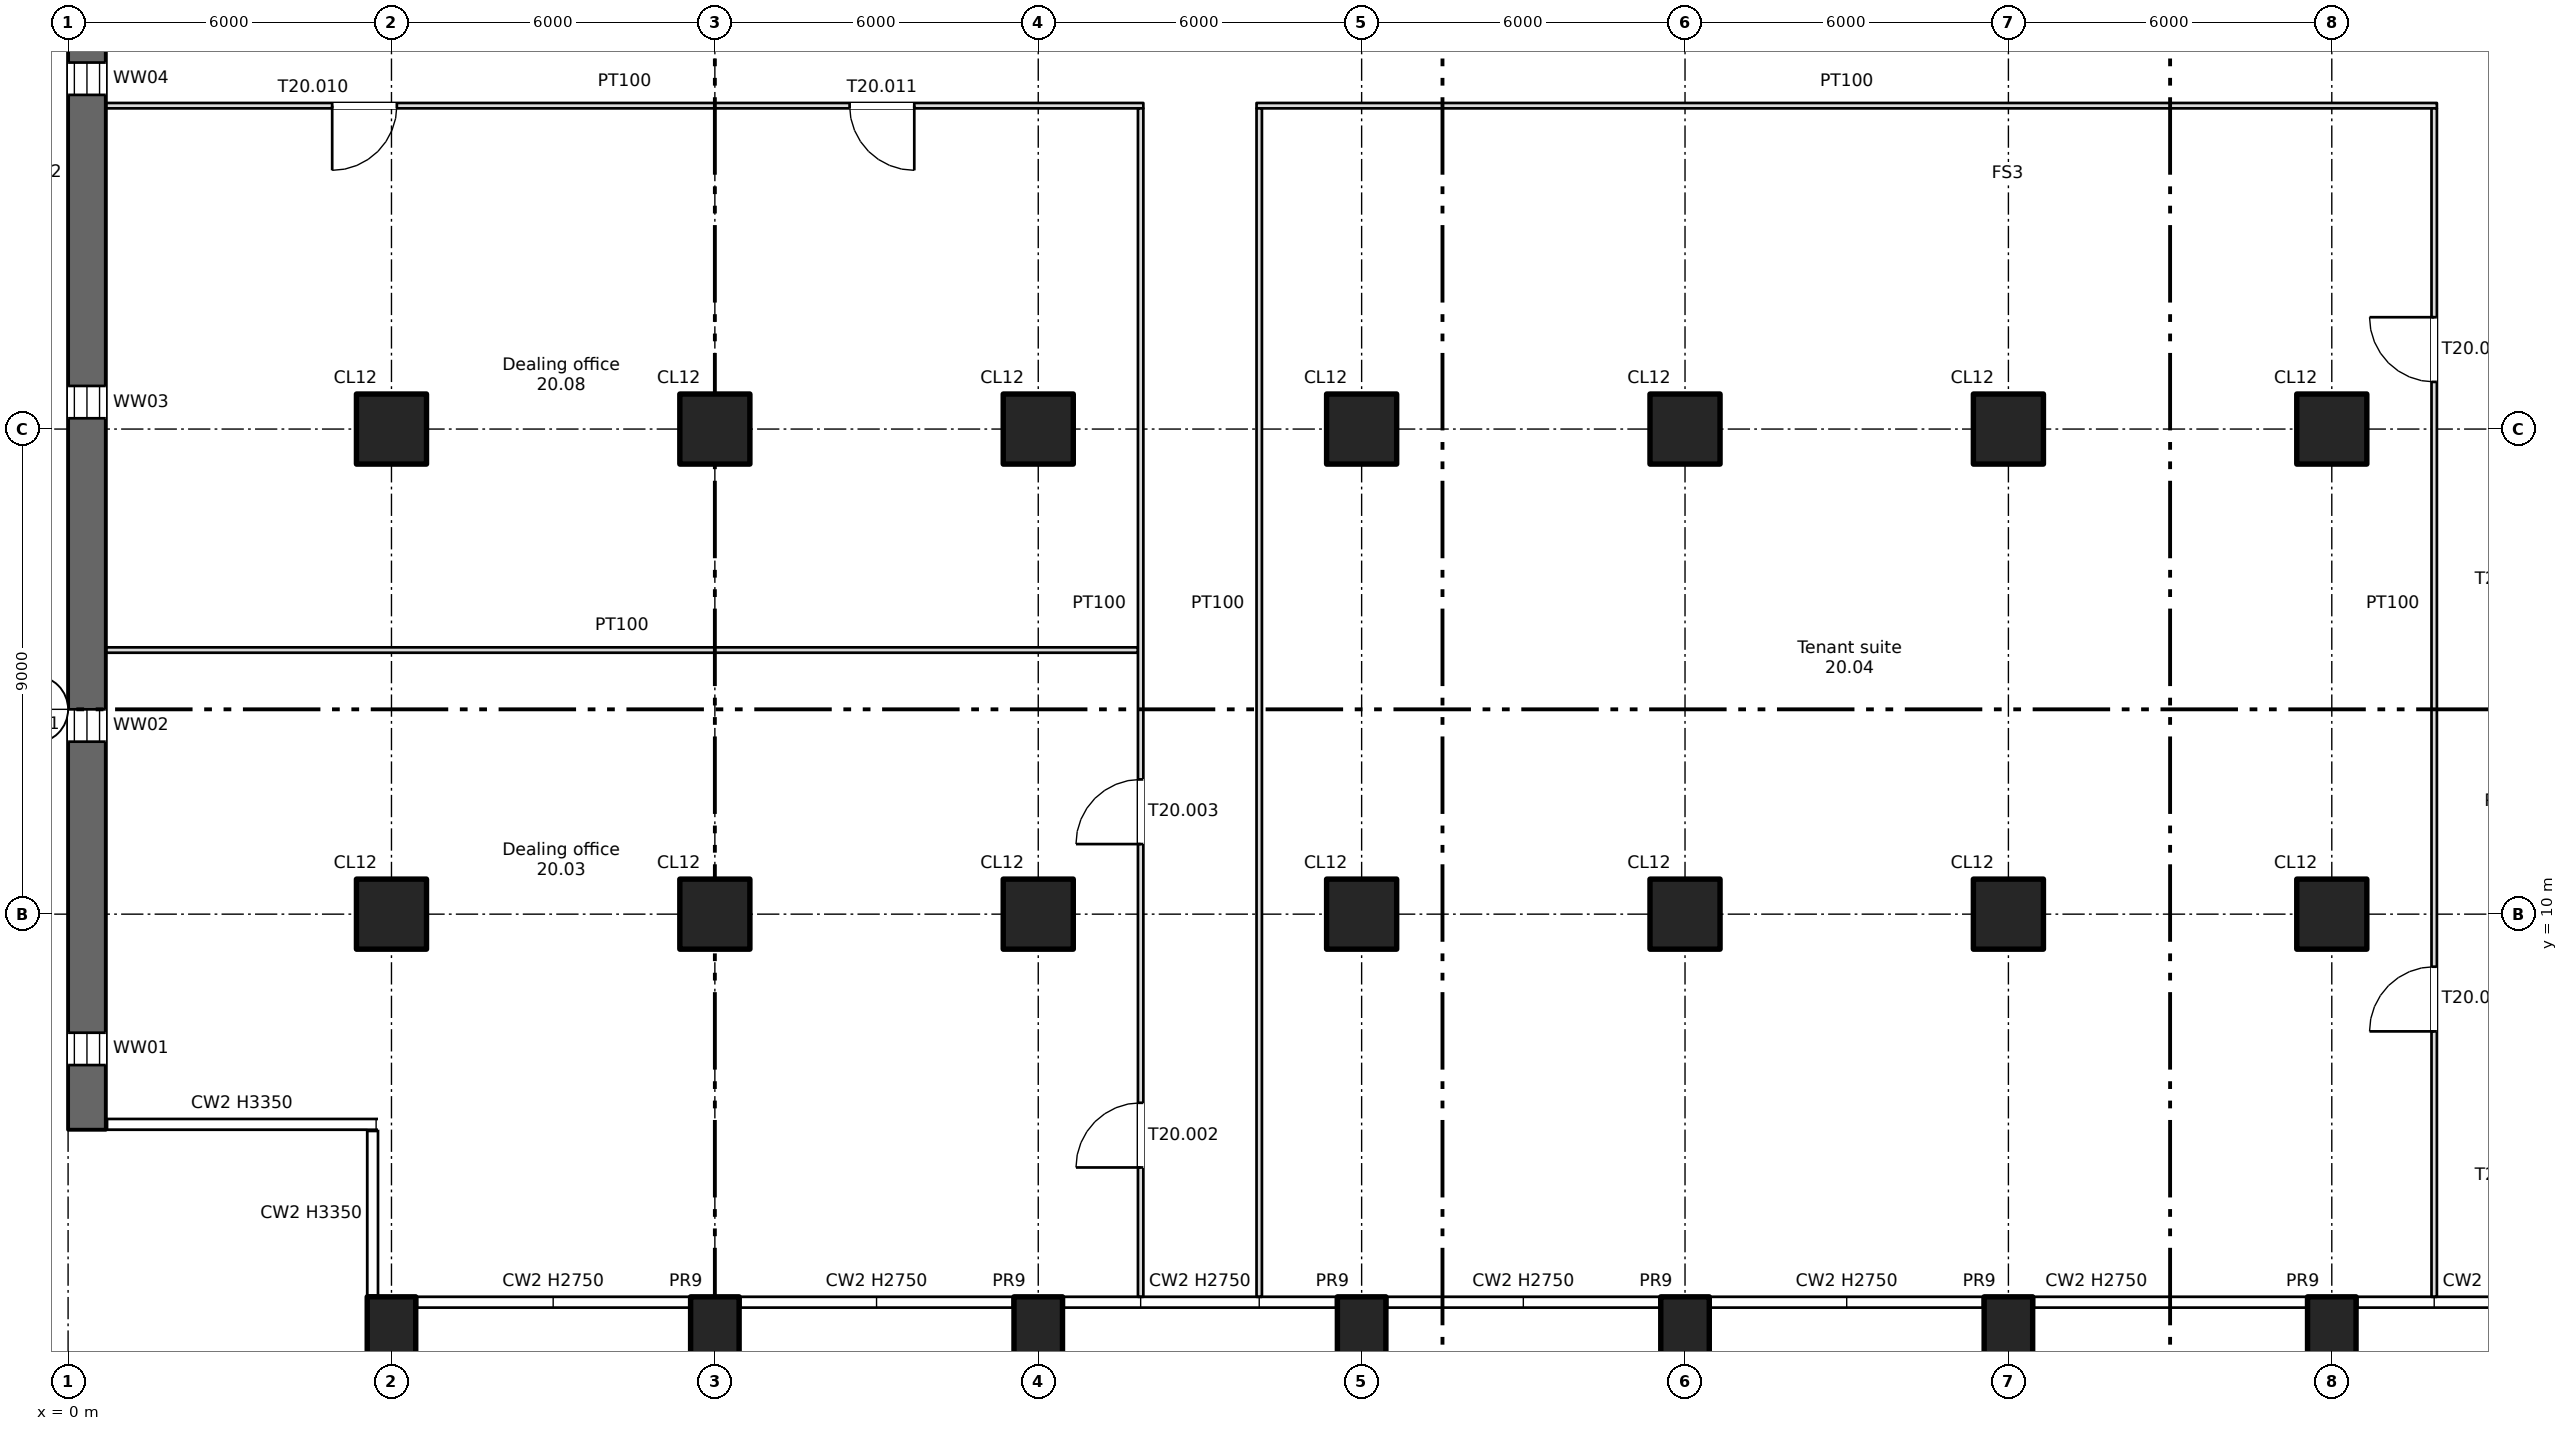
"""IFC4 building model, lengths in metres.
Left out: names, types, materials, properties, quantities, classifications, styles, units other than length and angle.
Written with IfcOpenShell. Run it as: python <this file> out.ifc"""

import sys

from ifc_helpers import new_model, si_unit, direction, frame, frame_2d, origin, origin_2d, place, context, subcontext, project, spatial, rectangle, extrude, element, fill, save


model = new_model("IFC4")
c1 = context("Model", 3, precision=1e-05, world=origin(), true_north=direction((0.0, 1.0)))
c2 = subcontext(c1, "Body", "Model", "MODEL_VIEW")
j1 = project(units=[si_unit("LENGTHUNIT", "METRE"), si_unit("PLANEANGLEUNIT", "RADIAN")], contexts=[c1])
p1 = place(None, origin())
s1 = spatial("IfcSite", under=j1, at=p1, CompositionType="ELEMENT")
p2 = place(p1, origin())
s2 = spatial("IfcBuilding", under=s1, at=p2, CompositionType="ELEMENT")
p3 = place(p2, frame((0.0, 0.0, 132.5)))
s3 = spatial("IfcBuildingStorey", under=s2, at=p3, CompositionType="ELEMENT", Elevation=132.5)
for number, where, z_axis, x_axis in (
    (1, (6.0, 2.2, -0.4), (0.0, 0.0, 1.0), (1.0, 0.0, 0.0)),
    (2, (12.0, 2.2, -0.4), (0.0, 0.0, 1.0), (1.0, 0.0, 0.0)),
    (3, (18.0, 2.2, -0.4), (0.0, 0.0, 1.0), (1.0, 0.0, 0.0)),
    (4, (24.0, 2.2, -0.4), (0.0, 0.0, 1.0), (1.0, 0.0, 0.0)),
    (5, (30.0, 2.2, -0.4), (0.0, 0.0, 1.0), (1.0, 0.0, 0.0)),
    (6, (36.0, 2.2, -0.4), (0.0, 0.0, 1.0), (1.0, 0.0, 0.0)),
    (7, (42.0, 2.2, -0.4), (0.0, 0.0, 1.0), (1.0, 0.0, 0.0)),
):
    element("IfcColumn", number, at=place(p3, frame(where, z_axis=z_axis, x_axis=x_axis)), inside=s3, PredefinedType="COLUMN", context=c2, shape_type="SweptSolid", body=[
        extrude(rectangle(XDim=0.9, YDim=1.4, at=origin_2d()), origin(), (0.0, 0.0, 1.0), 3.75),
    ])
for number, where, z_axis, x_axis in (
    (8, (6.0, 10.0, 0.0), (0.0, 0.0, 1.0), (1.0, 0.0, 0.0)),
    (9, (6.0, 19.0, 0.0), (0.0, 0.0, 1.0), (1.0, 0.0, 0.0)),
    (10, (12.0, 10.0, 0.0), (0.0, 0.0, 1.0), (1.0, 0.0, 0.0)),
    (11, (12.0, 19.0, 0.0), (0.0, 0.0, 1.0), (1.0, 0.0, 0.0)),
    (12, (18.0, 10.0, 0.0), (0.0, 0.0, 1.0), (1.0, 0.0, 0.0)),
    (13, (18.0, 19.0, 0.0), (0.0, 0.0, 1.0), (1.0, 0.0, 0.0)),
    (14, (24.0, 10.0, 0.0), (0.0, 0.0, 1.0), (1.0, 0.0, 0.0)),
    (15, (24.0, 19.0, 0.0), (0.0, 0.0, 1.0), (1.0, 0.0, 0.0)),
    (16, (30.0, 10.0, 0.0), (0.0, 0.0, 1.0), (1.0, 0.0, 0.0)),
    (17, (30.0, 19.0, 0.0), (0.0, 0.0, 1.0), (1.0, 0.0, 0.0)),
    (18, (36.0, 10.0, 0.0), (0.0, 0.0, 1.0), (1.0, 0.0, 0.0)),
    (19, (36.0, 19.0, 0.0), (0.0, 0.0, 1.0), (1.0, 0.0, 0.0)),
    (20, (42.0, 10.0, 0.0), (0.0, 0.0, 1.0), (1.0, 0.0, 0.0)),
    (21, (42.0, 19.0, 0.0), (0.0, 0.0, 1.0), (1.0, 0.0, 0.0)),
):
    element("IfcColumn", number, at=place(p3, frame(where, z_axis=z_axis, x_axis=x_axis)), inside=s3, PredefinedType="COLUMN", context=c2, shape_type="SweptSolid", body=[
        extrude(rectangle(XDim=1.3, YDim=1.3, at=origin_2d()), origin(), (0.0, 0.0, 1.0), 3.35),
    ])
p4 = place(p3, frame((0.35, 6.0, 0.0), z_axis=(0.0, 0.0, 1.0), x_axis=(0.0, 1.0, 0.0)))
e22 = element("IfcWall", 22, at=p4, inside=s3, PredefinedType="SHEAR", context=c2, shape_type="SweptSolid", body=[
    extrude(rectangle(XDim=35.5, YDim=0.7, at=frame_2d((17.75, 0.0))), origin(), (0.0, 0.0, 1.0), 3.35),
])
p5 = place(p4, frame((1.2, 0.0, 0.6)))
e23 = element("IfcOpeningElement", 23, at=p5, cuts=e22, PredefinedType="OPENING", context=c2, shape_type="SweptSolid", body=[
    extrude(rectangle(XDim=0.6, YDim=2.4, at=frame_2d((0.3, 1.2))), frame((0.0, 0.36, 0.0), z_axis=(0.0, -1.0, 0.0), x_axis=(1.0, 0.0, 0.0)), (0.0, 0.0, 1.0), 0.72),
])
p6 = place(p4, frame((7.2, 0.0, 0.6)))
e24 = element("IfcOpeningElement", 24, at=p6, cuts=e22, PredefinedType="OPENING", context=c2, shape_type="SweptSolid", body=[
    extrude(rectangle(XDim=0.6, YDim=2.4, at=frame_2d((0.3, 1.2))), frame((0.0, 0.36, 0.0), z_axis=(0.0, -1.0, 0.0), x_axis=(1.0, 0.0, 0.0)), (0.0, 0.0, 1.0), 0.72),
])
p7 = place(p4, frame((13.2, 0.0, 0.6)))
e25 = element("IfcOpeningElement", 25, at=p7, cuts=e22, PredefinedType="OPENING", context=c2, shape_type="SweptSolid", body=[
    extrude(rectangle(XDim=0.6, YDim=2.4, at=frame_2d((0.3, 1.2))), frame((0.0, 0.36, 0.0), z_axis=(0.0, -1.0, 0.0), x_axis=(1.0, 0.0, 0.0)), (0.0, 0.0, 1.0), 0.72),
])
p8 = place(p4, frame((19.2, 0.0, 0.6)))
e26 = element("IfcOpeningElement", 26, at=p8, cuts=e22, PredefinedType="OPENING", context=c2, shape_type="SweptSolid", body=[
    extrude(rectangle(XDim=0.6, YDim=2.4, at=frame_2d((0.3, 1.2))), frame((0.0, 0.36, 0.0), z_axis=(0.0, -1.0, 0.0), x_axis=(1.0, 0.0, 0.0)), (0.0, 0.0, 1.0), 0.72),
])
p9 = place(p4, frame((25.2, 0.0, 0.6)))
e27 = element("IfcOpeningElement", 27, at=p9, cuts=e22, PredefinedType="OPENING", context=c2, shape_type="SweptSolid", body=[
    extrude(rectangle(XDim=0.6, YDim=2.4, at=frame_2d((0.3, 1.2))), frame((0.0, 0.36, 0.0), z_axis=(0.0, -1.0, 0.0), x_axis=(1.0, 0.0, 0.0)), (0.0, 0.0, 1.0), 0.72),
])
p10 = place(p4, frame((31.2, 0.0, 0.6)))
e28 = element("IfcOpeningElement", 28, at=p10, cuts=e22, PredefinedType="OPENING", context=c2, shape_type="SweptSolid", body=[
    extrude(rectangle(XDim=0.6, YDim=2.4, at=frame_2d((0.3, 1.2))), frame((0.0, 0.36, 0.0), z_axis=(0.0, -1.0, 0.0), x_axis=(1.0, 0.0, 0.0)), (0.0, 0.0, 1.0), 0.72),
])
p11 = place(p3, frame((0.7, 14.9, 0.0), z_axis=(0.0, 0.0, 1.0), x_axis=(1.0, 0.0, 0.0)))
e29 = element("IfcWall", 29, at=p11, inside=s3, PredefinedType="PARTITIONING", context=c2, shape_type="SweptSolid", body=[
    extrude(rectangle(XDim=19.15, YDim=0.1, at=frame_2d((9.575, 0.0))), origin(), (0.0, 0.0, 1.0), 3.35),
])
p12 = place(p3, frame((0.7, 25.0, 0.0), z_axis=(0.0, 0.0, 1.0), x_axis=(1.0, 0.0, 0.0)))
e30 = element("IfcWall", 30, at=p12, inside=s3, PredefinedType="PARTITIONING", context=c2, shape_type="SweptSolid", body=[
    extrude(rectangle(XDim=19.25, YDim=0.1, at=frame_2d((9.625, 0.0))), origin(), (0.0, 0.0, 1.0), 3.35),
])
p13 = place(p12, frame((4.2, 0.0, 0.0)))
e31 = element("IfcOpeningElement", 31, at=p13, cuts=e30, PredefinedType="OPENING", context=c2, shape_type="SweptSolid", body=[
    extrude(rectangle(XDim=1.2, YDim=2.1, at=frame_2d((0.6, 1.05))), frame((0.0, 0.06, 0.0), z_axis=(0.0, -1.0, 0.0), x_axis=(1.0, 0.0, 0.0)), (0.0, 0.0, 1.0), 0.12),
])
p14 = place(p12, frame((13.8, 0.0, 0.0)))
e32 = element("IfcOpeningElement", 32, at=p14, cuts=e30, PredefinedType="OPENING", context=c2, shape_type="SweptSolid", body=[
    extrude(rectangle(XDim=1.2, YDim=2.1, at=frame_2d((0.6, 1.05))), frame((0.0, 0.06, 0.0), z_axis=(0.0, -1.0, 0.0), x_axis=(1.0, 0.0, 0.0)), (0.0, 0.0, 1.0), 0.12),
])
p15 = place(p3, frame((22.05, 25.0, 0.0), z_axis=(0.0, 0.0, 1.0), x_axis=(1.0, 0.0, 0.0)))
e33 = element("IfcWall", 33, at=p15, inside=s3, PredefinedType="PARTITIONING", context=c2, shape_type="SweptSolid", body=[
    extrude(rectangle(XDim=21.9, YDim=0.1, at=frame_2d((10.95, 0.0))), origin(), (0.0, 0.0, 1.0), 3.35),
])
p16 = place(p3, frame((19.9, 2.9, 0.0), z_axis=(0.0, 0.0, 1.0), x_axis=(0.0, 1.0, 0.0)))
e34 = element("IfcWall", 34, at=p16, inside=s3, PredefinedType="PARTITIONING", context=c2, shape_type="SweptSolid", body=[
    extrude(rectangle(XDim=22.05, YDim=0.1, at=frame_2d((11.025, 0.0))), origin(), (0.0, 0.0, 1.0), 3.35),
])
p17 = place(p16, frame((2.4, 0.0, 0.0)))
e35 = element("IfcOpeningElement", 35, at=p17, cuts=e34, PredefinedType="OPENING", context=c2, shape_type="SweptSolid", body=[
    extrude(rectangle(XDim=1.2, YDim=2.1, at=frame_2d((0.6, 1.05))), frame((0.0, 0.06, 0.0), z_axis=(0.0, -1.0, 0.0), x_axis=(1.0, 0.0, 0.0)), (0.0, 0.0, 1.0), 0.12),
])
p18 = place(p16, frame((8.4, 0.0, 0.0)))
e36 = element("IfcOpeningElement", 36, at=p18, cuts=e34, PredefinedType="OPENING", context=c2, shape_type="SweptSolid", body=[
    extrude(rectangle(XDim=1.2, YDim=2.1, at=frame_2d((0.6, 1.05))), frame((0.0, 0.06, 0.0), z_axis=(0.0, -1.0, 0.0), x_axis=(1.0, 0.0, 0.0)), (0.0, 0.0, 1.0), 0.12),
])
p19 = place(p3, frame((22.1, 2.9, 0.0), z_axis=(0.0, 0.0, 1.0), x_axis=(0.0, 1.0, 0.0)))
e37 = element("IfcWall", 37, at=p19, inside=s3, PredefinedType="PARTITIONING", context=c2, shape_type="SweptSolid", body=[
    extrude(rectangle(XDim=22.05, YDim=0.1, at=frame_2d((11.025, 0.0))), origin(), (0.0, 0.0, 1.0), 3.35),
])
p20 = place(p3, frame((43.9, 2.9, 0.0), z_axis=(0.0, 0.0, 1.0), x_axis=(0.0, 1.0, 0.0)))
e38 = element("IfcWall", 38, at=p20, inside=s3, PredefinedType="PARTITIONING", context=c2, shape_type="SweptSolid", body=[
    extrude(rectangle(XDim=22.05, YDim=0.1, at=frame_2d((11.025, 0.0))), origin(), (0.0, 0.0, 1.0), 3.35),
])
p21 = place(p20, frame((4.925, 0.0, 0.0)))
e39 = element("IfcOpeningElement", 39, at=p21, cuts=e38, PredefinedType="OPENING", context=c2, shape_type="SweptSolid", body=[
    extrude(rectangle(XDim=1.2, YDim=2.1, at=frame_2d((0.6, 1.05))), frame((0.0, 0.06, 0.0), z_axis=(0.0, -1.0, 0.0), x_axis=(1.0, 0.0, 0.0)), (0.0, 0.0, 1.0), 0.12),
])
p22 = place(p20, frame((16.975, 0.0, 0.0)))
e40 = element("IfcOpeningElement", 40, at=p22, cuts=e38, PredefinedType="OPENING", context=c2, shape_type="SweptSolid", body=[
    extrude(rectangle(XDim=1.2, YDim=2.1, at=frame_2d((0.6, 1.05))), frame((0.0, 0.06, 0.0), z_axis=(0.0, -1.0, 0.0), x_axis=(1.0, 0.0, 0.0)), (0.0, 0.0, 1.0), 0.12),
])
p23 = place(p5, origin())
e41 = element("IfcWindow", 41, at=p23, inside=s3, PartitioningType="SINGLE_PANEL", PredefinedType="WINDOW", context=c2, shape_type="SweptSolid", body=[
    extrude(rectangle(XDim=0.6, YDim=2.4, at=frame_2d((0.3, 1.2))), frame((0.0, 0.03, 0.0), z_axis=(0.0, -1.0, 0.0), x_axis=(1.0, 0.0, 0.0)), (0.0, 0.0, 1.0), 0.06),
])
fill(e23, e41)
p24 = place(p6, origin())
e42 = element("IfcWindow", 42, at=p24, inside=s3, PartitioningType="SINGLE_PANEL", PredefinedType="WINDOW", context=c2, shape_type="SweptSolid", body=[
    extrude(rectangle(XDim=0.6, YDim=2.4, at=frame_2d((0.3, 1.2))), frame((0.0, 0.03, 0.0), z_axis=(0.0, -1.0, 0.0), x_axis=(1.0, 0.0, 0.0)), (0.0, 0.0, 1.0), 0.06),
])
fill(e24, e42)
p25 = place(p7, origin())
e43 = element("IfcWindow", 43, at=p25, inside=s3, PartitioningType="SINGLE_PANEL", PredefinedType="WINDOW", context=c2, shape_type="SweptSolid", body=[
    extrude(rectangle(XDim=0.6, YDim=2.4, at=frame_2d((0.3, 1.2))), frame((0.0, 0.03, 0.0), z_axis=(0.0, -1.0, 0.0), x_axis=(1.0, 0.0, 0.0)), (0.0, 0.0, 1.0), 0.06),
])
fill(e25, e43)
p26 = place(p8, origin())
e44 = element("IfcWindow", 44, at=p26, inside=s3, PartitioningType="SINGLE_PANEL", PredefinedType="WINDOW", context=c2, shape_type="SweptSolid", body=[
    extrude(rectangle(XDim=0.6, YDim=2.4, at=frame_2d((0.3, 1.2))), frame((0.0, 0.03, 0.0), z_axis=(0.0, -1.0, 0.0), x_axis=(1.0, 0.0, 0.0)), (0.0, 0.0, 1.0), 0.06),
])
fill(e26, e44)
p27 = place(p17, origin())
e45 = element("IfcDoor", 45, at=p27, inside=s3, OperationType="SINGLE_SWING_LEFT", PredefinedType="DOOR", context=c2, shape_type="SweptSolid", body=[
    extrude(rectangle(XDim=1.2, YDim=2.1, at=frame_2d((0.6, 1.05))), frame((0.0, 0.025, 0.0), z_axis=(0.0, -1.0, 0.0), x_axis=(1.0, 0.0, 0.0)), (0.0, 0.0, 1.0), 0.05),
])
fill(e35, e45)
p28 = place(p18, origin())
e46 = element("IfcDoor", 46, at=p28, inside=s3, OperationType="SINGLE_SWING_LEFT", PredefinedType="DOOR", context=c2, shape_type="SweptSolid", body=[
    extrude(rectangle(XDim=1.2, YDim=2.1, at=frame_2d((0.6, 1.05))), frame((0.0, 0.025, 0.0), z_axis=(0.0, -1.0, 0.0), x_axis=(1.0, 0.0, 0.0)), (0.0, 0.0, 1.0), 0.05),
])
fill(e36, e46)
p29 = place(p21, origin())
e47 = element("IfcDoor", 47, at=p29, inside=s3, OperationType="SINGLE_SWING_LEFT", PredefinedType="DOOR", context=c2, shape_type="SweptSolid", body=[
    extrude(rectangle(XDim=1.2, YDim=2.1, at=frame_2d((0.6, 1.05))), frame((0.0, 0.025, 0.0), z_axis=(0.0, -1.0, 0.0), x_axis=(1.0, 0.0, 0.0)), (0.0, 0.0, 1.0), 0.05),
])
fill(e39, e47)
p30 = place(p22, origin())
e48 = element("IfcDoor", 48, at=p30, inside=s3, OperationType="SINGLE_SWING_RIGHT", PredefinedType="DOOR", context=c2, shape_type="SweptSolid", body=[
    extrude(rectangle(XDim=1.2, YDim=2.1, at=frame_2d((0.6, 1.05))), frame((0.0, 0.025, 0.0), z_axis=(0.0, -1.0, 0.0), x_axis=(1.0, 0.0, 0.0)), (0.0, 0.0, 1.0), 0.05),
])
fill(e40, e48)
p31 = place(p13, origin())
e49 = element("IfcDoor", 49, at=p31, inside=s3, OperationType="SINGLE_SWING_LEFT", PredefinedType="DOOR", context=c2, shape_type="SweptSolid", body=[
    extrude(rectangle(XDim=1.2, YDim=2.1, at=frame_2d((0.6, 1.05))), frame((0.0, 0.025, 0.0), z_axis=(0.0, -1.0, 0.0), x_axis=(1.0, 0.0, 0.0)), (0.0, 0.0, 1.0), 0.05),
])
fill(e31, e49)
p32 = place(p14, origin())
e50 = element("IfcDoor", 50, at=p32, inside=s3, OperationType="SINGLE_SWING_RIGHT", PredefinedType="DOOR", context=c2, shape_type="SweptSolid", body=[
    extrude(rectangle(XDim=1.2, YDim=2.1, at=frame_2d((0.6, 1.05))), frame((0.0, 0.025, 0.0), z_axis=(0.0, -1.0, 0.0), x_axis=(1.0, 0.0, 0.0)), (0.0, 0.0, 1.0), 0.05),
])
fill(e32, e50)
save(model, sys.argv[1])
